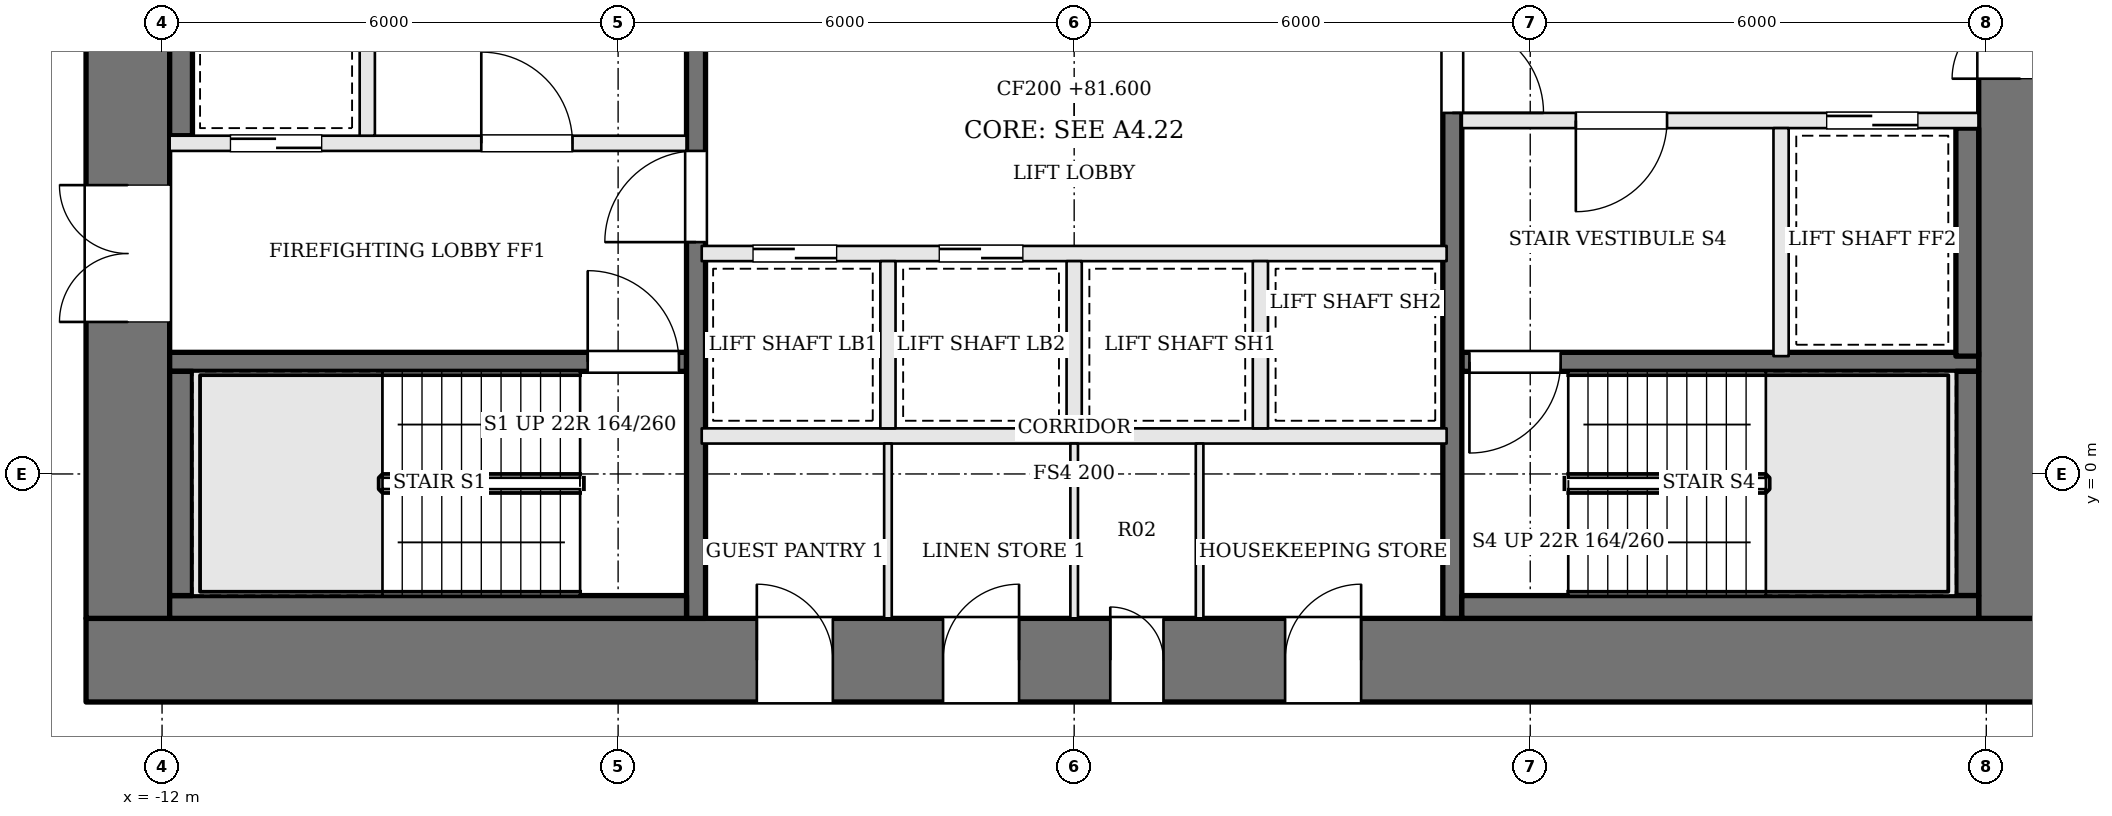
"""IFC4 building model, lengths in metres.
Left out: names, types, materials, properties, quantities, classifications, styles, units other than length and angle.
Written with IfcOpenShell. Run it as: python <this file> out.ifc"""

import sys

from ifc_helpers import new_model, si_unit, direction, frame, frame_2d, origin, place, context, subcontext, project, spatial, rectangle, extrude, element, fill, save


model = new_model("IFC4")
c1 = context("Model", 3, precision=1e-05, world=origin(), true_north=direction((0.0, 1.0)))
c2 = subcontext(c1, "Body", "Model", "MODEL_VIEW")
j1 = project(units=[si_unit("LENGTHUNIT", "METRE"), si_unit("PLANEANGLEUNIT", "RADIAN")], contexts=[c1])
p1 = place(None, origin())
s1 = spatial("IfcSite", under=j1, at=p1, CompositionType="ELEMENT")
p2 = place(p1, origin())
s2 = spatial("IfcBuilding", under=s1, at=p2, CompositionType="ELEMENT")
p3 = place(p2, frame((0.0, 0.0, 81.6)))
s3 = spatial("IfcBuildingStorey", under=s2, at=p3, CompositionType="ELEMENT", Elevation=81.6)
p4 = place(p3, frame((-13.0, -2.45, 0.0), z_axis=(0.0, 0.0, 1.0), x_axis=(1.0, 0.0, 0.0)))
e1 = element("IfcWall", 1, at=p4, inside=s3, PredefinedType="SHEAR", context=c2, shape_type="SweptSolid", body=[
    extrude(rectangle(XDim=26.0, YDim=1.1, at=frame_2d((13.0, 0.0))), origin(), (0.0, 0.0, 1.0), 3.6),
])
p5 = place(p4, frame((8.825, 0.0, 0.0)))
e2 = element("IfcOpeningElement", 2, at=p5, cuts=e1, PredefinedType="OPENING", context=c2, shape_type="SweptSolid", body=[
    extrude(rectangle(XDim=1.0, YDim=2.1, at=frame_2d((0.5, 1.05))), frame((0.0, 0.56, 0.0), z_axis=(0.0, -1.0, 0.0), x_axis=(1.0, 0.0, 0.0)), (0.0, 0.0, 1.0), 1.12),
])
p6 = place(p4, frame((11.275, 0.0, 0.0)))
e3 = element("IfcOpeningElement", 3, at=p6, cuts=e1, PredefinedType="OPENING", context=c2, shape_type="SweptSolid", body=[
    extrude(rectangle(XDim=1.0, YDim=2.1, at=frame_2d((0.5, 1.05))), frame((0.0, 0.56, 0.0), z_axis=(0.0, -1.0, 0.0), x_axis=(1.0, 0.0, 0.0)), (0.0, 0.0, 1.0), 1.12),
])
p7 = place(p4, frame((13.475, 0.0, 0.0)))
e4 = element("IfcOpeningElement", 4, at=p7, cuts=e1, PredefinedType="OPENING", context=c2, shape_type="SweptSolid", body=[
    extrude(rectangle(XDim=0.7, YDim=2.1, at=frame_2d((0.35, 1.05))), frame((0.0, 0.56, 0.0), z_axis=(0.0, -1.0, 0.0), x_axis=(1.0, 0.0, 0.0)), (0.0, 0.0, 1.0), 1.12),
])
p8 = place(p4, frame((15.775, 0.0, 0.0)))
e5 = element("IfcOpeningElement", 5, at=p8, cuts=e1, PredefinedType="OPENING", context=c2, shape_type="SweptSolid", body=[
    extrude(rectangle(XDim=1.0, YDim=2.1, at=frame_2d((0.5, 1.05))), frame((0.0, 0.56, 0.0), z_axis=(0.0, -1.0, 0.0), x_axis=(1.0, 0.0, 0.0)), (0.0, 0.0, 1.0), 1.12),
])
p9 = place(p3, frame((12.45, -1.9, 0.0), z_axis=(0.0, 0.0, 1.0), x_axis=(0.0, 1.0, 0.0)))
e6 = element("IfcWall", 6, at=p9, inside=s3, PredefinedType="SHEAR", context=c2, shape_type="SweptSolid", body=[
    extrude(rectangle(XDim=12.8, YDim=1.1, at=frame_2d((6.4, 0.0))), origin(), (0.0, 0.0, 1.0), 3.6),
])
p10 = place(p9, frame((7.1, 0.0, 0.0)))
e7 = element("IfcOpeningElement", 7, at=p10, cuts=e6, PredefinedType="OPENING", context=c2, shape_type="SweptSolid", body=[
    extrude(rectangle(XDim=1.8, YDim=2.1, at=frame_2d((0.9, 1.05))), frame((0.0, 0.56, 0.0), z_axis=(0.0, -1.0, 0.0), x_axis=(1.0, 0.0, 0.0)), (0.0, 0.0, 1.0), 1.12),
])
p11 = place(p3, frame((-12.45, -1.9, 0.0), z_axis=(0.0, 0.0, 1.0), x_axis=(0.0, 1.0, 0.0)))
e8 = element("IfcWall", 8, at=p11, inside=s3, PredefinedType="SHEAR", context=c2, shape_type="SweptSolid", body=[
    extrude(rectangle(XDim=12.8, YDim=1.1, at=frame_2d((6.4, 0.0))), origin(), (0.0, 0.0, 1.0), 3.6),
])
p12 = place(p11, frame((3.9, 0.0, 0.0)))
e9 = element("IfcOpeningElement", 9, at=p12, cuts=e8, PredefinedType="OPENING", context=c2, shape_type="SweptSolid", body=[
    extrude(rectangle(XDim=1.8, YDim=2.1, at=frame_2d((0.9, 1.05))), frame((0.0, 0.56, 0.0), z_axis=(0.0, -1.0, 0.0), x_axis=(1.0, 0.0, 0.0)), (0.0, 0.0, 1.0), 1.12),
])
p13 = place(p3, frame((-11.9, 1.475, 0.0), z_axis=(0.0, 0.0, 1.0), x_axis=(1.0, 0.0, 0.0)))
e10 = element("IfcWall", 10, at=p13, inside=s3, PredefinedType="SOLIDWALL", context=c2, shape_type="SweptSolid", body=[
    extrude(rectangle(XDim=6.8, YDim=0.25, at=frame_2d((3.4, 0.0))), origin(), (0.0, 0.0, 1.0), 3.4),
])
p14 = place(p13, frame((5.5, 0.0, 0.0)))
e11 = element("IfcOpeningElement", 11, at=p14, cuts=e10, PredefinedType="OPENING", context=c2, shape_type="SweptSolid", body=[
    extrude(rectangle(XDim=1.2, YDim=2.1, at=frame_2d((0.6, 1.05))), frame((0.0, 0.135, 0.0), z_axis=(0.0, -1.0, 0.0), x_axis=(1.0, 0.0, 0.0)), (0.0, 0.0, 1.0), 0.27),
])
p15 = place(p3, frame((-11.9, 4.35, 0.0), z_axis=(0.0, 0.0, 1.0), x_axis=(1.0, 0.0, 0.0)))
e12 = element("IfcWall", 12, at=p15, inside=s3, PredefinedType="SOLIDWALL", context=c2, shape_type="SweptSolid", body=[
    extrude(rectangle(XDim=6.8, YDim=0.2, at=frame_2d((3.4, 0.0))), origin(), (0.0, 0.0, 1.0), 3.4),
])
p16 = place(p15, frame((4.1, 0.0, 0.0)))
e13 = element("IfcOpeningElement", 13, at=p16, cuts=e12, PredefinedType="OPENING", context=c2, shape_type="SweptSolid", body=[
    extrude(rectangle(XDim=1.2, YDim=2.1, at=frame_2d((0.6, 1.05))), frame((0.0, 0.11, 0.0), z_axis=(0.0, -1.0, 0.0), x_axis=(1.0, 0.0, 0.0)), (0.0, 0.0, 1.0), 0.22),
])
p17 = place(p15, frame((0.8, 0.0, 0.0)))
e14 = element("IfcOpeningElement", 14, at=p17, cuts=e12, PredefinedType="OPENING", context=c2, shape_type="SweptSolid", body=[
    extrude(rectangle(XDim=1.2, YDim=2.1, at=frame_2d((0.6, 1.05))), frame((0.0, 0.11, 0.0), z_axis=(0.0, -1.0, 0.0), x_axis=(1.0, 0.0, 0.0)), (0.0, 0.0, 1.0), 0.22),
])
p18 = place(p3, frame((11.9, 4.65, 0.0), z_axis=(0.0, 0.0, 1.0), x_axis=(-1.0, 0.0, 0.0)))
e15 = element("IfcWall", 15, at=p18, inside=s3, PredefinedType="SOLIDWALL", context=c2, shape_type="SweptSolid", body=[
    extrude(rectangle(XDim=6.8, YDim=0.2, at=frame_2d((3.4, 0.0))), origin(), (0.0, 0.0, 1.0), 3.4),
])
p19 = place(p18, frame((4.1, 0.0, 0.0)))
e16 = element("IfcOpeningElement", 16, at=p19, cuts=e15, PredefinedType="OPENING", context=c2, shape_type="SweptSolid", body=[
    extrude(rectangle(XDim=1.2, YDim=2.1, at=frame_2d((0.6, 1.05))), frame((0.0, 0.11, 0.0), z_axis=(0.0, -1.0, 0.0), x_axis=(1.0, 0.0, 0.0)), (0.0, 0.0, 1.0), 0.22),
])
p20 = place(p18, frame((0.8, 0.0, 0.0)))
e17 = element("IfcOpeningElement", 17, at=p20, cuts=e15, PredefinedType="OPENING", context=c2, shape_type="SweptSolid", body=[
    extrude(rectangle(XDim=1.2, YDim=2.1, at=frame_2d((0.6, 1.05))), frame((0.0, 0.11, 0.0), z_axis=(0.0, -1.0, 0.0), x_axis=(1.0, 0.0, 0.0)), (0.0, 0.0, 1.0), 0.22),
])
p21 = place(p3, frame((11.9, 1.475, 0.0), z_axis=(0.0, 0.0, 1.0), x_axis=(-1.0, 0.0, 0.0)))
e18 = element("IfcWall", 18, at=p21, inside=s3, PredefinedType="SOLIDWALL", context=c2, shape_type="SweptSolid", body=[
    extrude(rectangle(XDim=6.8, YDim=0.25, at=frame_2d((3.4, 0.0))), origin(), (0.0, 0.0, 1.0), 3.4),
])
p22 = place(p21, frame((5.5, 0.0, 0.0)))
e19 = element("IfcOpeningElement", 19, at=p22, cuts=e18, PredefinedType="OPENING", context=c2, shape_type="SweptSolid", body=[
    extrude(rectangle(XDim=1.2, YDim=2.1, at=frame_2d((0.6, 1.05))), frame((0.0, 0.135, 0.0), z_axis=(0.0, -1.0, 0.0), x_axis=(1.0, 0.0, 0.0)), (0.0, 0.0, 1.0), 0.27),
])
for number, where, z_axis, x_axis in (
    (20, (-9.3, 4.45, 0.0), (0.0, 0.0, 1.0), (0.0, 1.0, 0.0)),
    (21, (9.3, 4.55, 0.0), (0.0, 0.0, 1.0), (0.0, -1.0, 0.0)),
):
    element("IfcWall", number, at=place(p3, frame(where, z_axis=z_axis, x_axis=x_axis)), inside=s3, PredefinedType="SOLIDWALL", context=c2, shape_type="SweptSolid", body=[
        extrude(rectangle(XDim=3.0, YDim=0.2, at=frame_2d((1.5, 0.0))), origin(), (0.0, 0.0, 1.0), 3.4),
    ])
p23 = place(p3, frame((-4.975, -1.9, 0.0), z_axis=(0.0, 0.0, 1.0), x_axis=(0.0, 1.0, 0.0)))
e22 = element("IfcWall", 22, at=p23, inside=s3, PredefinedType="SOLIDWALL", context=c2, shape_type="SweptSolid", body=[
    extrude(rectangle(XDim=12.8, YDim=0.25, at=frame_2d((6.4, 0.0))), origin(), (0.0, 0.0, 1.0), 3.4),
])
p24 = place(p23, frame((4.95, 0.0, 0.0)))
e23 = element("IfcOpeningElement", 23, at=p24, cuts=e22, PredefinedType="OPENING", context=c2, shape_type="SweptSolid", body=[
    extrude(rectangle(XDim=1.2, YDim=2.1, at=frame_2d((0.6, 1.05))), frame((0.0, 0.135, 0.0), z_axis=(0.0, -1.0, 0.0), x_axis=(1.0, 0.0, 0.0)), (0.0, 0.0, 1.0), 0.27),
])
p25 = place(p3, frame((4.975, 10.9, 0.0), z_axis=(0.0, 0.0, 1.0), x_axis=(0.0, -1.0, 0.0)))
e24 = element("IfcWall", 24, at=p25, inside=s3, PredefinedType="SOLIDWALL", context=c2, shape_type="SweptSolid", body=[
    extrude(rectangle(XDim=12.8, YDim=0.25, at=frame_2d((6.4, 0.0))), origin(), (0.0, 0.0, 1.0), 3.4),
])
p26 = place(p25, frame((4.95, 0.0, 0.0)))
e25 = element("IfcOpeningElement", 25, at=p26, cuts=e24, PredefinedType="OPENING", context=c2, shape_type="SweptSolid", body=[
    extrude(rectangle(XDim=1.2, YDim=2.1, at=frame_2d((0.6, 1.05))), frame((0.0, 0.135, 0.0), z_axis=(0.0, -1.0, 0.0), x_axis=(1.0, 0.0, 0.0)), (0.0, 0.0, 1.0), 0.27),
])
p27 = place(p3, frame((-11.9, -1.75, 0.0), z_axis=(0.0, 0.0, 1.0), x_axis=(1.0, 0.0, 0.0)))
e26 = element("IfcWall", 26, at=p27, inside=s3, PredefinedType="SOLIDWALL", context=c2, shape_type="SweptSolid", body=[
    extrude(rectangle(XDim=6.8, YDim=0.3, at=frame_2d((3.4, 0.0))), origin(), (0.0, 0.0, 1.0), 3.4),
])
p28 = place(p3, frame((-11.75, -1.6, 0.0), z_axis=(0.0, 0.0, 1.0), x_axis=(0.0, 1.0, 0.0)))
e27 = element("IfcWall", 27, at=p28, inside=s3, PredefinedType="SOLIDWALL", context=c2, shape_type="SweptSolid", body=[
    extrude(rectangle(XDim=2.95, YDim=0.3, at=frame_2d((1.475, 0.0))), origin(), (0.0, 0.0, 1.0), 3.4),
])
for number, where, z_axis, x_axis in (
    (28, (-11.75, 4.45, 0.0), (0.0, 0.0, 1.0), (0.0, 1.0, 0.0)),
    (29, (11.75, 4.55, 0.0), (0.0, 0.0, 1.0), (0.0, -1.0, 0.0)),
):
    element("IfcWall", number, at=place(p3, frame(where, z_axis=z_axis, x_axis=x_axis)), inside=s3, PredefinedType="SOLIDWALL", context=c2, shape_type="SweptSolid", body=[
        extrude(rectangle(XDim=3.0, YDim=0.3, at=frame_2d((1.5, 0.0))), origin(), (0.0, 0.0, 1.0), 3.4),
    ])
p29 = place(p3, frame((11.75, 1.35, 0.0), z_axis=(0.0, 0.0, 1.0), x_axis=(0.0, -1.0, 0.0)))
e30 = element("IfcWall", 30, at=p29, inside=s3, PredefinedType="SOLIDWALL", context=c2, shape_type="SweptSolid", body=[
    extrude(rectangle(XDim=2.95, YDim=0.3, at=frame_2d((1.475, 0.0))), origin(), (0.0, 0.0, 1.0), 3.4),
])
p30 = place(p3, frame((11.9, -1.75, 0.0), z_axis=(0.0, 0.0, 1.0), x_axis=(-1.0, 0.0, 0.0)))
e31 = element("IfcWall", 31, at=p30, inside=s3, PredefinedType="SOLIDWALL", context=c2, shape_type="SweptSolid", body=[
    extrude(rectangle(XDim=6.8, YDim=0.3, at=frame_2d((3.4, 0.0))), origin(), (0.0, 0.0, 1.0), 3.4),
])
p31 = place(p3, frame((-4.9, 0.5, 0.0), z_axis=(0.0, 0.0, 1.0), x_axis=(1.0, 0.0, 0.0)))
e32 = element("IfcWall", 32, at=p31, inside=s3, PredefinedType="SOLIDWALL", context=c2, shape_type="SweptSolid", body=[
    extrude(rectangle(XDim=9.8, YDim=0.2, at=frame_2d((4.9, 0.0))), origin(), (0.0, 0.0, 1.0), 3.4),
])
p32 = place(p3, frame((-4.9, 2.9, 0.0), z_axis=(0.0, 0.0, 1.0), x_axis=(1.0, 0.0, 0.0)))
e33 = element("IfcWall", 33, at=p32, inside=s3, PredefinedType="SOLIDWALL", context=c2, shape_type="SweptSolid", body=[
    extrude(rectangle(XDim=9.8, YDim=0.2, at=frame_2d((4.9, 0.0))), origin(), (0.0, 0.0, 1.0), 3.4),
])
p33 = place(p32, frame((0.675, 0.0, 0.0)))
e34 = element("IfcOpeningElement", 34, at=p33, cuts=e33, PredefinedType="OPENING", context=c2, shape_type="SweptSolid", body=[
    extrude(rectangle(XDim=1.1, YDim=2.1, at=frame_2d((0.55, 1.05))), frame((0.0, 0.11, 0.0), z_axis=(0.0, -1.0, 0.0), x_axis=(1.0, 0.0, 0.0)), (0.0, 0.0, 1.0), 0.22),
])
p34 = place(p32, frame((3.125, 0.0, 0.0)))
e35 = element("IfcOpeningElement", 35, at=p34, cuts=e33, PredefinedType="OPENING", context=c2, shape_type="SweptSolid", body=[
    extrude(rectangle(XDim=1.1, YDim=2.1, at=frame_2d((0.55, 1.05))), frame((0.0, 0.11, 0.0), z_axis=(0.0, -1.0, 0.0), x_axis=(1.0, 0.0, 0.0)), (0.0, 0.0, 1.0), 0.22),
])
for number, where, z_axis, x_axis in (
    (36, (-2.45, 0.6, 0.0), (0.0, 0.0, 1.0), (0.0, 1.0, 0.0)),
    (37, (0.0, 0.6, 0.0), (0.0, 0.0, 1.0), (0.0, 1.0, 0.0)),
    (38, (2.45, 0.6, 0.0), (0.0, 0.0, 1.0), (0.0, 1.0, 0.0)),
):
    element("IfcWall", number, at=place(p3, frame(where, z_axis=z_axis, x_axis=x_axis)), inside=s3, PredefinedType="SOLIDWALL", context=c2, shape_type="SweptSolid", body=[
        extrude(rectangle(XDim=2.2, YDim=0.2, at=frame_2d((1.1, 0.0))), origin(), (0.0, 0.0, 1.0), 3.4),
    ])
for number, where, z_axis, x_axis in (
    (39, (-2.45, -1.9, 0.0), (0.0, 0.0, 1.0), (0.0, 1.0, 0.0)),
    (40, (0.0, -1.9, 0.0), (0.0, 0.0, 1.0), (0.0, 1.0, 0.0)),
    (41, (1.65, -1.9, 0.0), (0.0, 0.0, 1.0), (0.0, 1.0, 0.0)),
):
    element("IfcWall", number, at=place(p3, frame(where, z_axis=z_axis, x_axis=x_axis)), inside=s3, PredefinedType="PARTITIONING", context=c2, shape_type="SweptSolid", body=[
        extrude(rectangle(XDim=2.3, YDim=0.1, at=frame_2d((1.15, 0.0))), origin(), (0.0, 0.0, 1.0), 3.4),
    ])
p35 = place(p12, origin())
e42 = element("IfcDoor", 42, at=p35, inside=s3, OperationType="DOUBLE_DOOR_SINGLE_SWING", PredefinedType="DOOR", context=c2, shape_type="SweptSolid", body=[
    extrude(rectangle(XDim=1.8, YDim=2.1, at=frame_2d((0.9, 1.05))), frame((0.0, 0.025, 0.0), z_axis=(0.0, -1.0, 0.0), x_axis=(1.0, 0.0, 0.0)), (0.0, 0.0, 1.0), 0.05),
])
fill(e9, e42)
p36 = place(p10, origin())
e43 = element("IfcDoor", 43, at=p36, inside=s3, OperationType="DOUBLE_DOOR_SINGLE_SWING", PredefinedType="DOOR", context=c2, shape_type="SweptSolid", body=[
    extrude(rectangle(XDim=1.8, YDim=2.1, at=frame_2d((0.9, 1.05))), frame((0.0, 0.025, 0.0), z_axis=(0.0, -1.0, 0.0), x_axis=(1.0, 0.0, 0.0)), (0.0, 0.0, 1.0), 0.05),
])
fill(e7, e43)
p37 = place(p24, origin())
e44 = element("IfcDoor", 44, at=p37, inside=s3, OperationType="SINGLE_SWING_LEFT", PredefinedType="DOOR", context=c2, shape_type="SweptSolid", body=[
    extrude(rectangle(XDim=1.2, YDim=2.1, at=frame_2d((0.6, 1.05))), frame((0.0, 0.025, 0.0), z_axis=(0.0, -1.0, 0.0), x_axis=(1.0, 0.0, 0.0)), (0.0, 0.0, 1.0), 0.05),
])
fill(e23, e44)
p38 = place(p26, origin())
e45 = element("IfcDoor", 45, at=p38, inside=s3, OperationType="SINGLE_SWING_RIGHT", PredefinedType="DOOR", context=c2, shape_type="SweptSolid", body=[
    extrude(rectangle(XDim=1.2, YDim=2.1, at=frame_2d((0.6, 1.05))), frame((0.0, 0.025, 0.0), z_axis=(0.0, -1.0, 0.0), x_axis=(1.0, 0.0, 0.0)), (0.0, 0.0, 1.0), 0.05),
])
fill(e25, e45)
p39 = place(p16, origin())
e46 = element("IfcDoor", 46, at=p39, inside=s3, OperationType="SINGLE_SWING_LEFT", PredefinedType="DOOR", context=c2, shape_type="SweptSolid", body=[
    extrude(rectangle(XDim=1.2, YDim=2.1, at=frame_2d((0.6, 1.05))), frame((0.0, 0.025, 0.0), z_axis=(0.0, -1.0, 0.0), x_axis=(1.0, 0.0, 0.0)), (0.0, 0.0, 1.0), 0.05),
])
fill(e13, e46)
p40 = place(p19, origin())
e47 = element("IfcDoor", 47, at=p40, inside=s3, OperationType="SINGLE_SWING_RIGHT", PredefinedType="DOOR", context=c2, shape_type="SweptSolid", body=[
    extrude(rectangle(XDim=1.2, YDim=2.1, at=frame_2d((0.6, 1.05))), frame((0.0, 0.025, 0.0), z_axis=(0.0, -1.0, 0.0), x_axis=(1.0, 0.0, 0.0)), (0.0, 0.0, 1.0), 0.05),
])
fill(e16, e47)
p41 = place(p14, origin())
e48 = element("IfcDoor", 48, at=p41, inside=s3, OperationType="SINGLE_SWING_LEFT", PredefinedType="DOOR", context=c2, shape_type="SweptSolid", body=[
    extrude(rectangle(XDim=1.2, YDim=2.1, at=frame_2d((0.6, 1.05))), frame((0.0, 0.025, 0.0), z_axis=(0.0, -1.0, 0.0), x_axis=(1.0, 0.0, 0.0)), (0.0, 0.0, 1.0), 0.05),
])
fill(e11, e48)
p42 = place(p22, origin())
e49 = element("IfcDoor", 49, at=p42, inside=s3, OperationType="SINGLE_SWING_RIGHT", PredefinedType="DOOR", context=c2, shape_type="SweptSolid", body=[
    extrude(rectangle(XDim=1.2, YDim=2.1, at=frame_2d((0.6, 1.05))), frame((0.0, 0.025, 0.0), z_axis=(0.0, -1.0, 0.0), x_axis=(1.0, 0.0, 0.0)), (0.0, 0.0, 1.0), 0.05),
])
fill(e19, e49)
p43 = place(p17, origin())
e50 = element("IfcDoor", 50, at=p43, inside=s3, OperationType="SLIDING_TO_RIGHT", PredefinedType="DOOR", context=c2, shape_type="SweptSolid", body=[
    extrude(rectangle(XDim=1.2, YDim=2.1, at=frame_2d((0.6, 1.05))), frame((0.0, 0.025, 0.0), z_axis=(0.0, -1.0, 0.0), x_axis=(1.0, 0.0, 0.0)), (0.0, 0.0, 1.0), 0.05),
])
fill(e14, e50)
p44 = place(p20, origin())
e51 = element("IfcDoor", 51, at=p44, inside=s3, OperationType="SLIDING_TO_RIGHT", PredefinedType="DOOR", context=c2, shape_type="SweptSolid", body=[
    extrude(rectangle(XDim=1.2, YDim=2.1, at=frame_2d((0.6, 1.05))), frame((0.0, 0.025, 0.0), z_axis=(0.0, -1.0, 0.0), x_axis=(1.0, 0.0, 0.0)), (0.0, 0.0, 1.0), 0.05),
])
fill(e17, e51)
p45 = place(p33, origin())
e52 = element("IfcDoor", 52, at=p45, inside=s3, OperationType="SLIDING_TO_RIGHT", PredefinedType="DOOR", context=c2, shape_type="SweptSolid", body=[
    extrude(rectangle(XDim=1.1, YDim=2.1, at=frame_2d((0.55, 1.05))), frame((0.0, 0.025, 0.0), z_axis=(0.0, -1.0, 0.0), x_axis=(1.0, 0.0, 0.0)), (0.0, 0.0, 1.0), 0.05),
])
fill(e34, e52)
p46 = place(p34, origin())
e53 = element("IfcDoor", 53, at=p46, inside=s3, OperationType="SLIDING_TO_LEFT", PredefinedType="DOOR", context=c2, shape_type="SweptSolid", body=[
    extrude(rectangle(XDim=1.1, YDim=2.1, at=frame_2d((0.55, 1.05))), frame((0.0, 0.025, 0.0), z_axis=(0.0, -1.0, 0.0), x_axis=(1.0, 0.0, 0.0)), (0.0, 0.0, 1.0), 0.05),
])
fill(e35, e53)
p47 = place(p5, origin())
e54 = element("IfcDoor", 54, at=p47, inside=s3, OperationType="SINGLE_SWING_LEFT", PredefinedType="DOOR", context=c2, shape_type="SweptSolid", body=[
    extrude(rectangle(XDim=1.0, YDim=2.1, at=frame_2d((0.5, 1.05))), frame((0.0, 0.025, 0.0), z_axis=(0.0, -1.0, 0.0), x_axis=(1.0, 0.0, 0.0)), (0.0, 0.0, 1.0), 0.05),
])
fill(e2, e54)
p48 = place(p6, origin())
e55 = element("IfcDoor", 55, at=p48, inside=s3, OperationType="SINGLE_SWING_RIGHT", PredefinedType="DOOR", context=c2, shape_type="SweptSolid", body=[
    extrude(rectangle(XDim=1.0, YDim=2.1, at=frame_2d((0.5, 1.05))), frame((0.0, 0.025, 0.0), z_axis=(0.0, -1.0, 0.0), x_axis=(1.0, 0.0, 0.0)), (0.0, 0.0, 1.0), 0.05),
])
fill(e3, e55)
p49 = place(p7, origin())
e56 = element("IfcDoor", 56, at=p49, inside=s3, OperationType="SINGLE_SWING_LEFT", PredefinedType="DOOR", context=c2, shape_type="SweptSolid", body=[
    extrude(rectangle(XDim=0.7, YDim=2.1, at=frame_2d((0.35, 1.05))), frame((0.0, 0.025, 0.0), z_axis=(0.0, -1.0, 0.0), x_axis=(1.0, 0.0, 0.0)), (0.0, 0.0, 1.0), 0.05),
])
fill(e4, e56)
p50 = place(p8, origin())
e57 = element("IfcDoor", 57, at=p50, inside=s3, OperationType="SINGLE_SWING_RIGHT", PredefinedType="DOOR", context=c2, shape_type="SweptSolid", body=[
    extrude(rectangle(XDim=1.0, YDim=2.1, at=frame_2d((0.5, 1.05))), frame((0.0, 0.025, 0.0), z_axis=(0.0, -1.0, 0.0), x_axis=(1.0, 0.0, 0.0)), (0.0, 0.0, 1.0), 0.05),
])
fill(e5, e57)
save(model, sys.argv[1])
